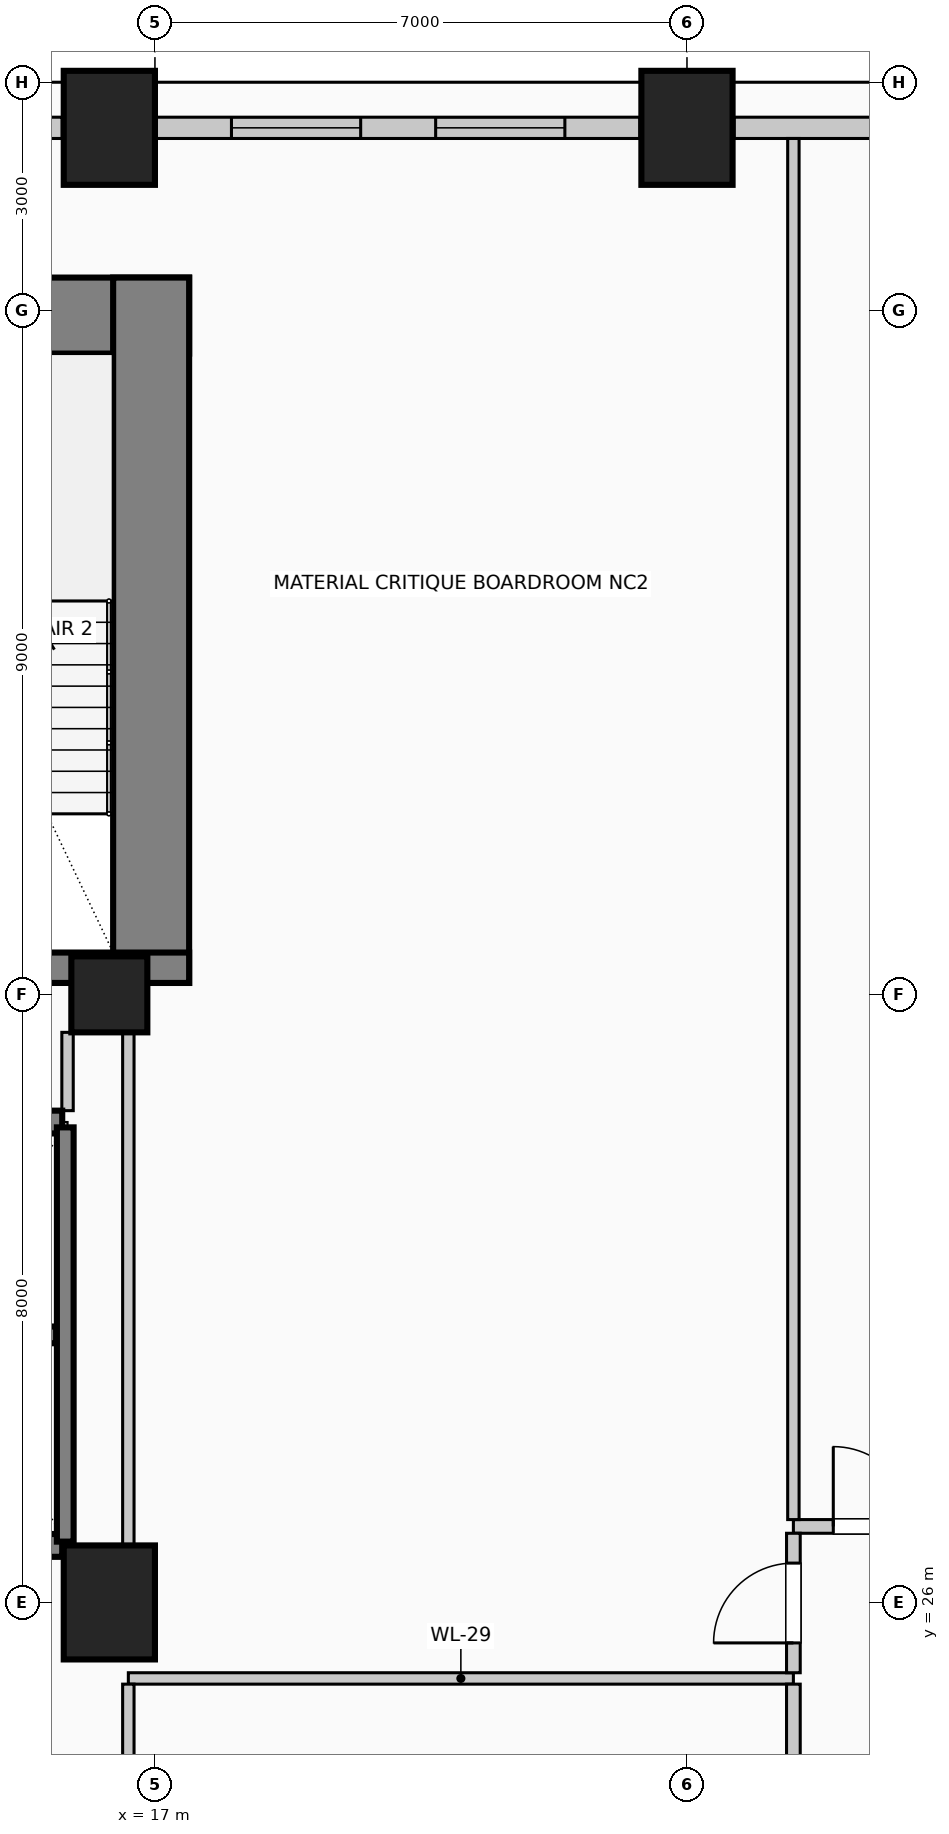
"""IFC4 building model, lengths in metres.
Left out: names, types, materials, properties, quantities, classifications, styles, units other than length and angle.
Written with IfcOpenShell. Run it as: python <this file> out.ifc"""

import sys

from ifc_helpers import new_model, si_unit, direction, frame, frame_2d, origin, origin_2d, place, context, subcontext, project, spatial, rectangle, circle, extrude, element, fill, save


model = new_model("IFC4")
c1 = context("Model", 3, precision=1e-05, world=origin(), true_north=direction((0.0, 1.0)))
c2 = subcontext(c1, "Body", "Model", "MODEL_VIEW")
j1 = project(units=[si_unit("LENGTHUNIT", "METRE"), si_unit("PLANEANGLEUNIT", "RADIAN")], contexts=[c1])
p1 = place(None, origin())
s1 = spatial("IfcSite", under=j1, at=p1, CompositionType="ELEMENT")
p2 = place(p1, origin())
s2 = spatial("IfcBuilding", under=s1, at=p2, CompositionType="ELEMENT")
p3 = place(p2, frame((0.0, 0.0, 62.6)))
s3 = spatial("IfcBuildingStorey", under=s2, at=p3, CompositionType="ELEMENT", Elevation=62.6)
p4 = place(p3, frame((2.55, 42.93, 0.0), z_axis=(0.0, 0.0, 1.0), x_axis=(1.0, 0.0, 0.0)))
e1 = element("IfcWall", 1, at=p4, inside=s3, PredefinedType="SHEAR", context=c2, shape_type="SweptSolid", body=[
    extrude(rectangle(XDim=14.9, YDim=1.0, at=frame_2d((7.45, 0.0))), origin(), (0.0, 0.0, 1.0), 4.0),
])
p5 = place(p3, frame((16.95, 34.15, 0.0), z_axis=(0.0, 0.0, 1.0), x_axis=(0.0, 1.0, 0.0)))
e2 = element("IfcWall", 2, at=p5, inside=s3, PredefinedType="SHEAR", context=c2, shape_type="SweptSolid", body=[
    extrude(rectangle(XDim=9.28, YDim=1.0, at=frame_2d((4.64, 0.0))), origin(), (0.0, 0.0, 1.0), 4.0),
])
p6 = place(p3, frame((12.29, 34.35, 0.0), z_axis=(0.0, 0.0, 1.0), x_axis=(1.0, 0.0, 0.0)))
e3 = element("IfcWall", 3, at=p6, inside=s3, PredefinedType="SHEAR", context=c2, shape_type="SweptSolid", body=[
    extrude(rectangle(XDim=5.16, YDim=0.4, at=frame_2d((2.58, 0.0))), origin(), (0.0, 0.0, 1.0), 4.0),
])
p7 = place(p6, frame((1.4, 0.0, 0.0)))
e4 = element("IfcOpeningElement", 4, at=p7, cuts=e3, PredefinedType="OPENING", context=c2, shape_type="SweptSolid", body=[
    extrude(rectangle(XDim=1.15, YDim=2.2, at=frame_2d((0.575, 1.1))), frame((0.0, 0.21, 0.0), z_axis=(0.0, -1.0, 0.0), x_axis=(1.0, 0.0, 0.0)), (0.0, 0.0, 1.0), 0.42),
])
for number, where, z_axis, x_axis in (
    (5, (16.4, 45.4, 0.0), (0.0, 0.0, 1.0), (1.0, 0.0, 0.0)),
    (6, (24.0, 45.4, 0.0), (0.0, 0.0, 1.0), (1.0, 0.0, 0.0)),
    (7, (16.4, 26.0, 0.0), (0.0, 0.0, 1.0), (1.0, 0.0, 0.0)),
):
    element("IfcColumn", number, at=place(p3, frame(where, z_axis=z_axis, x_axis=x_axis)), inside=s3, PredefinedType="COLUMN", context=c2, shape_type="SweptSolid", body=[
        extrude(rectangle(XDim=1.2, YDim=1.5, at=origin_2d()), origin(), (0.0, 0.0, 1.0), 4.0),
    ])
p8 = place(p3, frame((16.4, 34.0, 0.0), z_axis=(0.0, 0.0, 1.0), x_axis=(1.0, 0.0, 0.0)))
e8 = element("IfcColumn", 8, at=p8, inside=s3, PredefinedType="COLUMN", context=c2, shape_type="SweptSolid", body=[
    extrude(circle(Radius=0.5, at=origin_2d()), origin(), (0.0, 0.0, 1.0), 4.0),
])
p9 = place(p3, frame((14.47, 45.4, 0.0), z_axis=(0.0, 0.0, 1.0), x_axis=(1.0, 0.0, 0.0)))
e9 = element("IfcWall", 9, at=p9, inside=s3, PredefinedType="SOLIDWALL", context=c2, shape_type="SweptSolid", body=[
    extrude(rectangle(XDim=1.31, YDim=0.28, at=frame_2d((0.655, 0.0))), origin(), (0.0, 0.0, 1.0), 2.85),
])
p10 = place(p3, frame((17.02, 45.4, 0.0), z_axis=(0.0, 0.0, 1.0), x_axis=(1.0, 0.0, 0.0)))
e10 = element("IfcWall", 10, at=p10, inside=s3, PredefinedType="SOLIDWALL", context=c2, shape_type="SweptSolid", body=[
    extrude(rectangle(XDim=6.36, YDim=0.28, at=frame_2d((3.18, 0.0))), origin(), (0.0, 0.0, 1.0), 2.85),
])
p11 = place(p10, frame((0.987, 0.0, 0.5)))
e11 = element("IfcOpeningElement", 11, at=p11, cuts=e10, PredefinedType="OPENING", context=c2, shape_type="SweptSolid", body=[
    extrude(rectangle(XDim=1.7, YDim=1.95, at=frame_2d((0.85, 0.975))), frame((0.0, 0.15, 0.0), z_axis=(0.0, -1.0, 0.0), x_axis=(1.0, 0.0, 0.0)), (0.0, 0.0, 1.0), 0.3),
])
p12 = place(p10, frame((3.673, 0.0, 0.5)))
e12 = element("IfcOpeningElement", 12, at=p12, cuts=e10, PredefinedType="OPENING", context=c2, shape_type="SweptSolid", body=[
    extrude(rectangle(XDim=1.7, YDim=1.95, at=frame_2d((0.85, 0.975))), frame((0.0, 0.15, 0.0), z_axis=(0.0, -1.0, 0.0), x_axis=(1.0, 0.0, 0.0)), (0.0, 0.0, 1.0), 0.3),
])
p13 = place(p3, frame((24.62, 45.4, 0.0), z_axis=(0.0, 0.0, 1.0), x_axis=(1.0, 0.0, 0.0)))
e13 = element("IfcWall", 13, at=p13, inside=s3, PredefinedType="SOLIDWALL", context=c2, shape_type="SweptSolid", body=[
    extrude(rectangle(XDim=3.91, YDim=0.28, at=frame_2d((1.955, 0.0))), origin(), (0.0, 0.0, 1.0), 2.85),
])
for number, where, z_axis, x_axis in (
    (14, (15.78, 26.75, 0.0), (0.0, 0.0, 1.0), (-1.0, 0.0, 0.0)),
    (15, (14.0, 32.32, 0.0), (0.0, 0.0, 1.0), (1.0, 0.0, 0.0)),
):
    element("IfcWall", number, at=place(p3, frame(where, z_axis=z_axis, x_axis=x_axis)), inside=s3, PredefinedType="SOLIDWALL", context=c2, shape_type="SweptSolid", body=[
        extrude(rectangle(XDim=1.78, YDim=0.3, at=frame_2d((0.89, 0.0))), origin(), (0.0, 0.0, 1.0), 4.0),
    ])
p14 = place(p3, frame((15.82, 26.8, 0.0), z_axis=(0.0, 0.0, 1.0), x_axis=(0.0, 1.0, 0.0)))
e16 = element("IfcWall", 16, at=p14, inside=s3, PredefinedType="SOLIDWALL", context=c2, shape_type="SweptSolid", body=[
    extrude(rectangle(XDim=5.45, YDim=0.22, at=frame_2d((2.725, 0.0))), origin(), (0.0, 0.0, 1.0), 4.0),
])
p15 = place(p3, frame((12.3, 29.52, 0.0), z_axis=(0.0, 0.0, 1.0), x_axis=(1.0, 0.0, 0.0)))
e17 = element("IfcWall", 17, at=p15, inside=s3, PredefinedType="SOLIDWALL", context=c2, shape_type="SweptSolid", body=[
    extrude(rectangle(XDim=3.4, YDim=0.22, at=frame_2d((1.7, 0.0))), origin(), (0.0, 0.0, 1.0), 4.0),
])
p16 = place(p3, frame((16.65, 25.0, 0.0), z_axis=(0.0, 0.0, 1.0), x_axis=(1.0, 0.0, 0.0)))
e18 = element("IfcWall", 18, at=p16, inside=s3, PredefinedType="PARTITIONING", context=c2, shape_type="SweptSolid", body=[
    extrude(rectangle(XDim=8.75, YDim=0.15, at=frame_2d((4.375, 0.0))), origin(), (0.0, 0.0, 1.0), 3.7),
])
p17 = place(p3, frame((25.4, 27.0, 0.0), z_axis=(0.0, 0.0, 1.0), x_axis=(1.0, 0.0, 0.0)))
e19 = element("IfcWall", 19, at=p17, inside=s3, PredefinedType="PARTITIONING", context=c2, shape_type="SweptSolid", body=[
    extrude(rectangle(XDim=2.1, YDim=0.18, at=frame_2d((1.05, 0.0))), origin(), (0.0, 0.0, 1.0), 3.7),
])
p18 = place(p17, frame((0.525, 0.0, 0.0)))
e20 = element("IfcOpeningElement", 20, at=p18, cuts=e19, PredefinedType="OPENING", context=c2, shape_type="SweptSolid", body=[
    extrude(rectangle(XDim=1.05, YDim=2.15, at=frame_2d((0.525, 1.075))), frame((0.0, 0.1, 0.0), z_axis=(0.0, -1.0, 0.0), x_axis=(1.0, 0.0, 0.0)), (0.0, 0.0, 1.0), 0.2),
])
p19 = place(p3, frame((15.85, 32.47, 0.0), z_axis=(0.0, 0.0, 1.0), x_axis=(0.0, 1.0, 0.0)))
e21 = element("IfcWall", 21, at=p19, inside=s3, PredefinedType="PARTITIONING", context=c2, shape_type="SweptSolid", body=[
    extrude(rectangle(XDim=1.03, YDim=0.15, at=frame_2d((0.515, 0.0))), origin(), (0.0, 0.0, 1.0), 3.7),
])
p20 = place(p3, frame((16.65, 21.19, 0.0), z_axis=(0.0, 0.0, 1.0), x_axis=(0.0, 1.0, 0.0)))
e22 = element("IfcWall", 22, at=p20, inside=s3, PredefinedType="PARTITIONING", context=c2, shape_type="SweptSolid", body=[
    extrude(rectangle(XDim=3.735, YDim=0.15, at=frame_2d((1.868, 0.0))), origin(), (0.0, 0.0, 1.0), 2.995),
])
p21 = place(p3, frame((16.65, 26.75, 0.0), z_axis=(0.0, 0.0, 1.0), x_axis=(0.0, 1.0, 0.0)))
e23 = element("IfcWall", 23, at=p21, inside=s3, PredefinedType="PARTITIONING", context=c2, shape_type="SweptSolid", body=[
    extrude(rectangle(XDim=6.75, YDim=0.15, at=frame_2d((3.375, 0.0))), origin(), (0.0, 0.0, 1.0), 2.995),
])
p22 = place(p3, frame((25.4, 21.19, 0.0), z_axis=(0.0, 0.0, 1.0), x_axis=(0.0, 1.0, 0.0)))
e24 = element("IfcWall", 24, at=p22, inside=s3, PredefinedType="PARTITIONING", context=c2, shape_type="SweptSolid", body=[
    extrude(rectangle(XDim=3.735, YDim=0.18, at=frame_2d((1.868, 0.0))), origin(), (0.0, 0.0, 1.0), 3.7),
])
p23 = place(p3, frame((25.4, 25.075, 0.0), z_axis=(0.0, 0.0, 1.0), x_axis=(0.0, 1.0, 0.0)))
e25 = element("IfcWall", 25, at=p23, inside=s3, PredefinedType="PARTITIONING", context=c2, shape_type="SweptSolid", body=[
    extrude(rectangle(XDim=1.835, YDim=0.18, at=frame_2d((0.917, 0.0))), origin(), (0.0, 0.0, 1.0), 3.7),
])
p24 = place(p23, frame((0.393, 0.0, 0.0)))
e26 = element("IfcOpeningElement", 26, at=p24, cuts=e25, PredefinedType="OPENING", context=c2, shape_type="SweptSolid", body=[
    extrude(rectangle(XDim=1.05, YDim=2.15, at=frame_2d((0.525, 1.075))), frame((0.0, 0.1, 0.0), z_axis=(0.0, -1.0, 0.0), x_axis=(1.0, 0.0, 0.0)), (0.0, 0.0, 1.0), 0.2),
])
p25 = place(p3, frame((25.4, 27.09, 0.0), z_axis=(0.0, 0.0, 1.0), x_axis=(0.0, 1.0, 0.0)))
e27 = element("IfcWall", 27, at=p25, inside=s3, PredefinedType="PARTITIONING", context=c2, shape_type="SweptSolid", body=[
    extrude(rectangle(XDim=18.17, YDim=0.15, at=frame_2d((9.085, 0.0))), origin(), (0.0, 0.0, 1.0), 3.7),
])
p26 = place(p11, origin())
e28 = element("IfcWindow", 28, at=p26, inside=s3, PartitioningType="SINGLE_PANEL", PredefinedType="WINDOW", context=c2, shape_type="SweptSolid", body=[
    extrude(rectangle(XDim=1.7, YDim=1.95, at=frame_2d((0.85, 0.975))), frame((0.0, 0.03, 0.0), z_axis=(0.0, -1.0, 0.0), x_axis=(1.0, 0.0, 0.0)), (0.0, 0.0, 1.0), 0.06),
])
fill(e11, e28)
p27 = place(p12, origin())
e29 = element("IfcWindow", 29, at=p27, inside=s3, PartitioningType="SINGLE_PANEL", PredefinedType="WINDOW", context=c2, shape_type="SweptSolid", body=[
    extrude(rectangle(XDim=1.7, YDim=1.95, at=frame_2d((0.85, 0.975))), frame((0.0, 0.03, 0.0), z_axis=(0.0, -1.0, 0.0), x_axis=(1.0, 0.0, 0.0)), (0.0, 0.0, 1.0), 0.06),
])
fill(e12, e29)
p28 = place(p18, origin())
e30 = element("IfcDoor", 30, at=p28, inside=s3, OperationType="SINGLE_SWING_LEFT", PredefinedType="DOOR", context=c2, shape_type="SweptSolid", body=[
    extrude(rectangle(XDim=1.05, YDim=2.15, at=frame_2d((0.525, 1.075))), frame((0.0, 0.025, 0.0), z_axis=(0.0, -1.0, 0.0), x_axis=(1.0, 0.0, 0.0)), (0.0, 0.0, 1.0), 0.05),
])
fill(e20, e30)
p29 = place(p24, origin())
e31 = element("IfcDoor", 31, at=p29, inside=s3, OperationType="SINGLE_SWING_LEFT", PredefinedType="DOOR", context=c2, shape_type="SweptSolid", body=[
    extrude(rectangle(XDim=1.05, YDim=2.15, at=frame_2d((0.525, 1.075))), frame((0.0, 0.025, 0.0), z_axis=(0.0, -1.0, 0.0), x_axis=(1.0, 0.0, 0.0)), (0.0, 0.0, 1.0), 0.05),
])
fill(e26, e31)
save(model, sys.argv[1])
